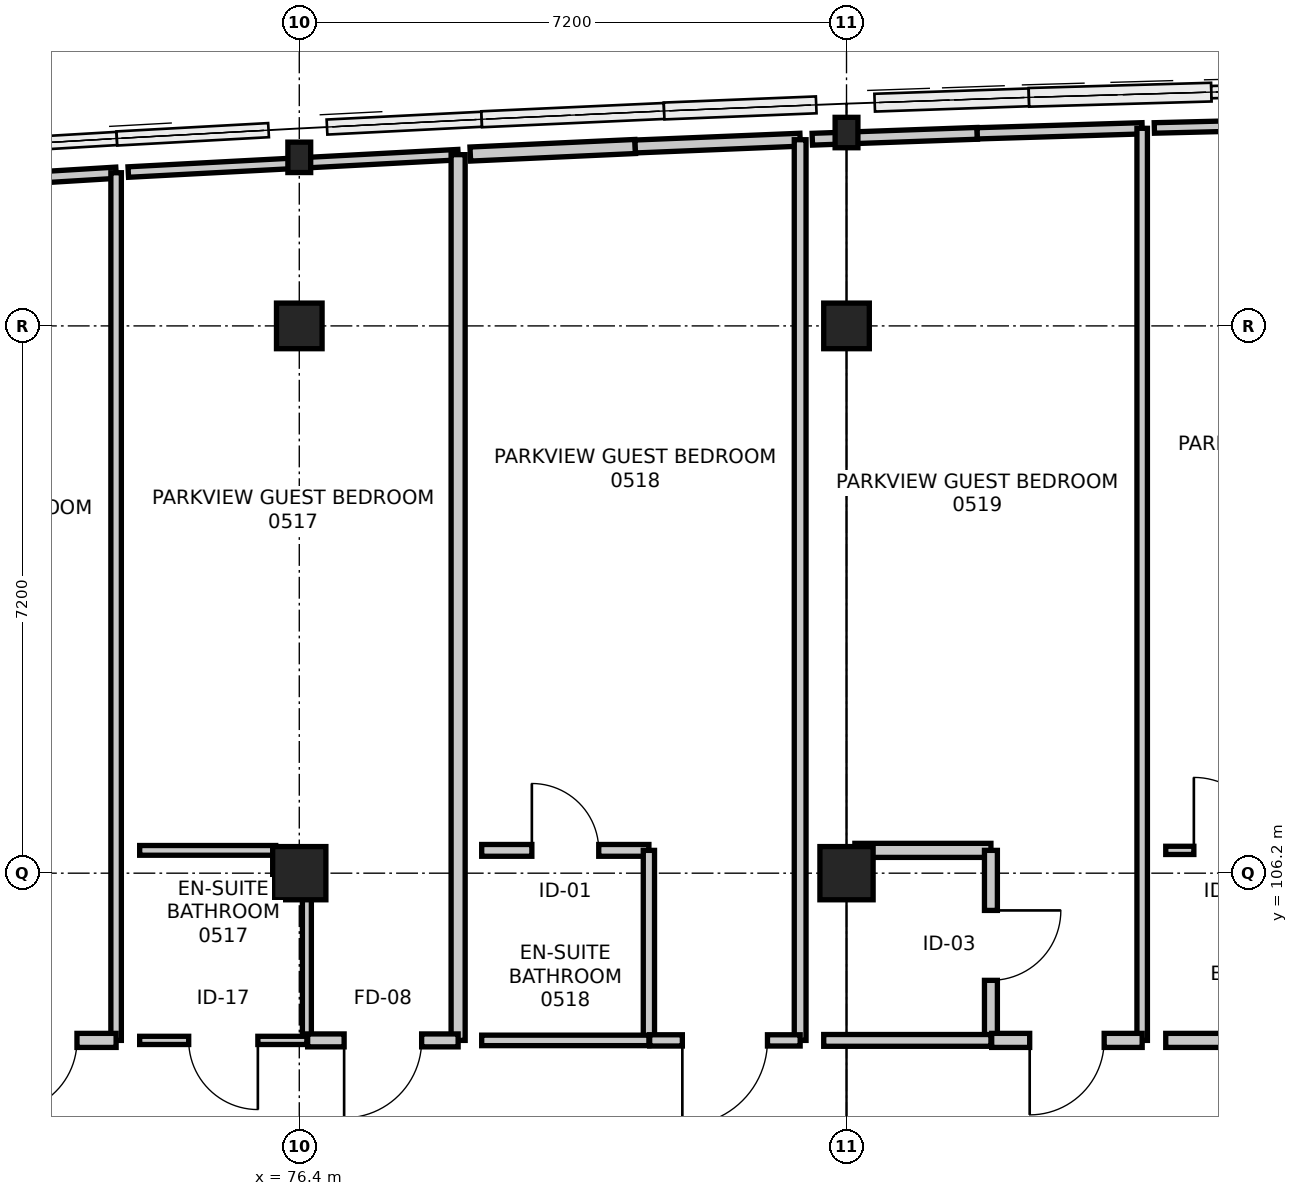
"""IFC4 building model, lengths in metres.
Left out: names, types, materials, properties, quantities, classifications, styles, units other than length and angle.
Written with IfcOpenShell. Run it as: python <this file> out.ifc"""

import sys

from ifc_helpers import new_model, si_unit, direction, frame, frame_2d, origin, origin_2d, place, context, subcontext, project, spatial, rectangle, i_section, extrude, element, fill, save


model = new_model("IFC4")
c1 = context("Model", 3, precision=1e-05, world=origin(), true_north=direction((0.0, 1.0)))
c2 = subcontext(c1, "Body", "Model", "MODEL_VIEW")
j1 = project(units=[si_unit("LENGTHUNIT", "METRE"), si_unit("PLANEANGLEUNIT", "RADIAN")], contexts=[c1])
p1 = place(None, origin())
s1 = spatial("IfcSite", under=j1, at=p1, CompositionType="ELEMENT")
p2 = place(p1, origin())
s2 = spatial("IfcBuilding", under=s1, at=p2, CompositionType="ELEMENT")
p3 = place(p2, frame((0.0, 0.0, 22.8)))
s3 = spatial("IfcBuildingStorey", under=s2, at=p3, CompositionType="ELEMENT", Elevation=22.8)
p4 = place(p3, frame((76.4, 106.2, 0.0), z_axis=(0.0, 0.0, 1.0), x_axis=(1.0, 0.0, 0.0)))
e1 = element("IfcColumn", 1, at=p4, inside=s3, PredefinedType="COLUMN", context=c2, shape_type="SweptSolid", body=[
    extrude(rectangle(XDim=0.7, YDim=0.7, at=origin_2d()), origin(), (0.0, 0.0, 1.0), 3.6),
])
p5 = place(p3, frame((76.4, 113.4, 0.0), z_axis=(0.0, 0.0, 1.0), x_axis=(1.0, 0.0, 0.0)))
e2 = element("IfcColumn", 2, at=p5, inside=s3, PredefinedType="COLUMN", context=c2, shape_type="SweptSolid", body=[
    extrude(rectangle(XDim=0.6, YDim=0.6, at=origin_2d()), origin(), (0.0, 0.0, 1.0), 3.6),
])
p6 = place(p3, frame((76.4, 115.618, 0.0), z_axis=(0.0, 0.0, 1.0), x_axis=(1.0, 0.0, 0.0)))
e3 = element("IfcColumn", 3, at=p6, inside=s3, PredefinedType="COLUMN", context=c2, shape_type="SweptSolid", body=[
    extrude(i_section(OverallWidth=0.3, OverallDepth=0.4, WebThickness=0.013, FlangeThickness=0.024, FilletRadius=0.027, at=origin_2d()), origin(), (0.0, 0.0, 1.0), 3.6),
])
p7 = place(p3, frame((83.6, 106.2, 0.0), z_axis=(0.0, 0.0, 1.0), x_axis=(1.0, 0.0, 0.0)))
e4 = element("IfcColumn", 4, at=p7, inside=s3, PredefinedType="COLUMN", context=c2, shape_type="SweptSolid", body=[
    extrude(rectangle(XDim=0.7, YDim=0.7, at=origin_2d()), origin(), (0.0, 0.0, 1.0), 3.6),
])
p8 = place(p3, frame((83.6, 113.4, 0.0), z_axis=(0.0, 0.0, 1.0), x_axis=(1.0, 0.0, 0.0)))
e5 = element("IfcColumn", 5, at=p8, inside=s3, PredefinedType="COLUMN", context=c2, shape_type="SweptSolid", body=[
    extrude(rectangle(XDim=0.6, YDim=0.6, at=origin_2d()), origin(), (0.0, 0.0, 1.0), 3.6),
])
p9 = place(p3, frame((83.6, 115.944, 0.0), z_axis=(0.0, 0.0, 1.0), x_axis=(1.0, 0.0, 0.0)))
e6 = element("IfcColumn", 6, at=p9, inside=s3, PredefinedType="COLUMN", context=c2, shape_type="SweptSolid", body=[
    extrude(i_section(OverallWidth=0.3, OverallDepth=0.4, WebThickness=0.013, FlangeThickness=0.024, FilletRadius=0.027, at=origin_2d()), origin(), (0.0, 0.0, 1.0), 3.6),
])
p10 = place(p3, frame((69.65, 115.152, 0.0), z_axis=(0.0, 0.0, 1.0), x_axis=(0.998169832058, 0.060473021833, 0.0)))
e7 = element("IfcWall", 7, at=p10, inside=s3, PredefinedType="PARTITIONING", context=c2, shape_type="SweptSolid", body=[
    extrude(rectangle(XDim=4.348, YDim=0.148, at=frame_2d((2.174, 0.0))), origin(), (0.0, 0.0, 1.0), 2.926),
])
p11 = place(p3, frame((73.99, 115.415, 0.0), z_axis=(0.0, 0.0, 1.0), x_axis=(0.0, -1.0, 0.0)))
e8 = element("IfcWall", 8, at=p11, inside=s3, PredefinedType="PARTITIONING", context=c2, shape_type="SweptSolid", body=[
    extrude(rectangle(XDim=11.415, YDim=0.138, at=frame_2d((5.708, 0.0))), origin(), (0.0, 0.0, 1.0), 2.735),
])
p12 = place(p3, frame((73.99, 104.0, 0.0), z_axis=(0.0, 0.0, 1.0), x_axis=(-1.0, 0.0, 0.0)))
e9 = element("IfcWall", 9, at=p12, inside=s3, PredefinedType="PARTITIONING", context=c2, shape_type="SweptSolid", body=[
    extrude(rectangle(XDim=1.98, YDim=0.185, at=frame_2d((0.99, 0.0))), origin(), (0.0, 0.0, 1.0), 3.35),
])
p13 = place(p12, frame((0.515, 0.0, 0.0)))
e10 = element("IfcOpeningElement", 10, at=p13, cuts=e9, PredefinedType="OPENING", context=c2, shape_type="SweptSolid", body=[
    extrude(rectangle(XDim=0.95, YDim=2.1, at=frame_2d((0.475, 1.05))), frame((0.0, 0.103, 0.0), z_axis=(0.0, -1.0, 0.0), x_axis=(1.0, 0.0, 0.0)), (0.0, 0.0, 1.0), 0.205),
])
p14 = place(p3, frame((74.3, 106.5, 0.0), z_axis=(0.0, 0.0, 1.0), x_axis=(1.0, 0.0, 0.0)))
e11 = element("IfcWall", 11, at=p14, inside=s3, PredefinedType="PARTITIONING", context=c2, shape_type="SweptSolid", body=[
    extrude(rectangle(XDim=1.79, YDim=0.128, at=frame_2d((0.895, 0.0))), origin(), (0.0, 0.0, 1.0), 3.35),
])
p15 = place(p3, frame((76.5, 106.09, 0.0), z_axis=(0.0, 0.0, 1.0), x_axis=(0.0, -1.0, 0.0)))
e12 = element("IfcWall", 12, at=p15, inside=s3, PredefinedType="PARTITIONING", context=c2, shape_type="SweptSolid", body=[
    extrude(rectangle(XDim=2.09, YDim=0.118, at=frame_2d((1.045, 0.0))), origin(), (0.0, 0.0, 1.0), 2.685),
])
p16 = place(p3, frame((76.5, 104.0, 0.0), z_axis=(0.0, 0.0, 1.0), x_axis=(-1.0, 0.0, 0.0)))
e13 = element("IfcWall", 13, at=p16, inside=s3, PredefinedType="PARTITIONING", context=c2, shape_type="SweptSolid", body=[
    extrude(rectangle(XDim=2.2, YDim=0.108, at=frame_2d((1.1, 0.0))), origin(), (0.0, 0.0, 1.0), 2.685),
])
p17 = place(p16, frame((0.645, 0.0, 0.0)))
e14 = element("IfcOpeningElement", 14, at=p17, cuts=e13, PredefinedType="OPENING", context=c2, shape_type="SweptSolid", body=[
    extrude(rectangle(XDim=0.91, YDim=2.11, at=frame_2d((0.455, 1.055))), frame((0.0, 0.064, 0.0), z_axis=(0.0, -1.0, 0.0), x_axis=(1.0, 0.0, 0.0)), (0.0, 0.0, 1.0), 0.128),
])
p18 = place(p3, frame((74.15, 115.424, 0.0), z_axis=(0.0, 0.0, 1.0), x_axis=(0.998613791759, 0.052635490965, 0.0)))
e15 = element("IfcWall", 15, at=p18, inside=s3, PredefinedType="PARTITIONING", context=c2, shape_type="SweptSolid", body=[
    extrude(rectangle(XDim=4.346, YDim=0.138, at=frame_2d((2.173, 0.0))), origin(), (0.0, 0.0, 1.0), 2.926),
])
p19 = place(p3, frame((78.49, 115.653, 0.0), z_axis=(0.0, 0.0, 1.0), x_axis=(0.0, -1.0, 0.0)))
e16 = element("IfcWall", 16, at=p19, inside=s3, PredefinedType="PARTITIONING", context=c2, shape_type="SweptSolid", body=[
    extrude(rectangle(XDim=11.653, YDim=0.185, at=frame_2d((5.826, 0.0))), origin(), (0.0, 0.0, 1.0), 2.735),
])
p20 = place(p3, frame((78.49, 104.0, 0.0), z_axis=(0.0, 0.0, 1.0), x_axis=(-1.0, 0.0, 0.0)))
e17 = element("IfcWall", 17, at=p20, inside=s3, PredefinedType="PARTITIONING", context=c2, shape_type="SweptSolid", body=[
    extrude(rectangle(XDim=1.98, YDim=0.17, at=frame_2d((0.99, 0.0))), origin(), (0.0, 0.0, 1.0), 2.685),
])
p21 = place(p20, frame((0.48, 0.0, 0.0)))
e18 = element("IfcOpeningElement", 18, at=p21, cuts=e17, PredefinedType="OPENING", context=c2, shape_type="SweptSolid", body=[
    extrude(rectangle(XDim=1.02, YDim=2.15, at=frame_2d((0.51, 1.075))), frame((0.0, 0.095, 0.0), z_axis=(0.0, -1.0, 0.0), x_axis=(1.0, 0.0, 0.0)), (0.0, 0.0, 1.0), 0.19),
])
p22 = place(p3, frame((78.8, 106.5, 0.0), z_axis=(0.0, 0.0, 1.0), x_axis=(1.0, 0.0, 0.0)))
e19 = element("IfcWall", 19, at=p22, inside=s3, PredefinedType="PARTITIONING", context=c2, shape_type="SweptSolid", body=[
    extrude(rectangle(XDim=2.2, YDim=0.155, at=frame_2d((1.1, 0.0))), origin(), (0.0, 0.0, 1.0), 3.35),
])
p23 = place(p22, frame((0.66, 0.0, 0.0)))
e20 = element("IfcOpeningElement", 20, at=p23, cuts=e19, PredefinedType="OPENING", context=c2, shape_type="SweptSolid", body=[
    extrude(rectangle(XDim=0.88, YDim=2.06, at=frame_2d((0.44, 1.03))), frame((0.0, 0.087, 0.0), z_axis=(0.0, -1.0, 0.0), x_axis=(1.0, 0.0, 0.0)), (0.0, 0.0, 1.0), 0.175),
])
p24 = place(p3, frame((81.0, 106.5, 0.0), z_axis=(0.0, 0.0, 1.0), x_axis=(0.0, -1.0, 0.0)))
e21 = element("IfcWall", 21, at=p24, inside=s3, PredefinedType="PARTITIONING", context=c2, shape_type="SweptSolid", body=[
    extrude(rectangle(XDim=2.5, YDim=0.148, at=frame_2d((1.25, 0.0))), origin(), (0.0, 0.0, 1.0), 2.735),
])
p25 = place(p3, frame((81.0, 104.0, 0.0), z_axis=(0.0, 0.0, 1.0), x_axis=(-1.0, 0.0, 0.0)))
e22 = element("IfcWall", 22, at=p25, inside=s3, PredefinedType="PARTITIONING", context=c2, shape_type="SweptSolid", body=[
    extrude(rectangle(XDim=2.2, YDim=0.138, at=frame_2d((1.1, 0.0))), origin(), (0.0, 0.0, 1.0), 3.35),
])
p26 = place(p3, frame((78.65, 115.661, 0.0), z_axis=(0.0, 0.0, 1.0), x_axis=(0.998953423906, 0.045739008159, 0.0)))
e23 = element("IfcWall", 23, at=p26, inside=s3, PredefinedType="PARTITIONING", context=c2, shape_type="SweptSolid", body=[
    extrude(rectangle(XDim=2.172, YDim=0.185, at=frame_2d((1.086, 0.0))), origin(), (0.0, 0.0, 1.0), 2.926),
])
p27 = place(p3, frame((80.82, 115.76, 0.0), z_axis=(0.0, 0.0, 1.0), x_axis=(0.999153216902, 0.041144248131, 0.0)))
e24 = element("IfcWall", 24, at=p27, inside=s3, PredefinedType="PARTITIONING", context=c2, shape_type="SweptSolid", body=[
    extrude(rectangle(XDim=2.172, YDim=0.17, at=frame_2d((1.086, 0.0))), origin(), (0.0, 0.0, 1.0), 2.926),
])
p28 = place(p3, frame((82.99, 115.85, 0.0), z_axis=(0.0, 0.0, 1.0), x_axis=(0.0, -1.0, 0.0)))
e25 = element("IfcWall", 25, at=p28, inside=s3, PredefinedType="PARTITIONING", context=c2, shape_type="SweptSolid", body=[
    extrude(rectangle(XDim=11.85, YDim=0.155, at=frame_2d((5.925, 0.0))), origin(), (0.0, 0.0, 1.0), 2.735),
])
p29 = place(p3, frame((82.99, 104.0, 0.0), z_axis=(0.0, 0.0, 1.0), x_axis=(-1.0, 0.0, 0.0)))
e26 = element("IfcWall", 26, at=p29, inside=s3, PredefinedType="PARTITIONING", context=c2, shape_type="SweptSolid", body=[
    extrude(rectangle(XDim=1.98, YDim=0.148, at=frame_2d((0.99, 0.0))), origin(), (0.0, 0.0, 1.0), 3.35),
])
p30 = place(p29, frame((0.43, 0.0, 0.0)))
e27 = element("IfcOpeningElement", 27, at=p30, cuts=e26, PredefinedType="OPENING", context=c2, shape_type="SweptSolid", body=[
    extrude(rectangle(XDim=1.12, YDim=2.2, at=frame_2d((0.56, 1.1))), frame((0.0, 0.084, 0.0), z_axis=(0.0, -1.0, 0.0), x_axis=(1.0, 0.0, 0.0)), (0.0, 0.0, 1.0), 0.168),
])
p31 = place(p3, frame((83.71, 106.5, 0.0), z_axis=(0.0, 0.0, 1.0), x_axis=(1.0, 0.0, 0.0)))
e28 = element("IfcWall", 28, at=p31, inside=s3, PredefinedType="PARTITIONING", context=c2, shape_type="SweptSolid", body=[
    extrude(rectangle(XDim=1.79, YDim=0.185, at=frame_2d((0.895, 0.0))), origin(), (0.0, 0.0, 1.0), 2.685),
])
p32 = place(p3, frame((85.5, 106.5, 0.0), z_axis=(0.0, 0.0, 1.0), x_axis=(0.0, -1.0, 0.0)))
e29 = element("IfcWall", 29, at=p32, inside=s3, PredefinedType="PARTITIONING", context=c2, shape_type="SweptSolid", body=[
    extrude(rectangle(XDim=2.5, YDim=0.17, at=frame_2d((1.25, 0.0))), origin(), (0.0, 0.0, 1.0), 2.735),
])
p33 = place(p32, frame((0.79, 0.0, 0.0)))
e30 = element("IfcOpeningElement", 30, at=p33, cuts=e29, PredefinedType="OPENING", context=c2, shape_type="SweptSolid", body=[
    extrude(rectangle(XDim=0.92, YDim=2.1, at=frame_2d((0.46, 1.05))), frame((0.0, 0.095, 0.0), z_axis=(0.0, -1.0, 0.0), x_axis=(1.0, 0.0, 0.0)), (0.0, 0.0, 1.0), 0.19),
])
p34 = place(p3, frame((85.5, 104.0, 0.0), z_axis=(0.0, 0.0, 1.0), x_axis=(-1.0, 0.0, 0.0)))
e31 = element("IfcWall", 31, at=p34, inside=s3, PredefinedType="PARTITIONING", context=c2, shape_type="SweptSolid", body=[
    extrude(rectangle(XDim=2.2, YDim=0.155, at=frame_2d((1.1, 0.0))), origin(), (0.0, 0.0, 1.0), 2.685),
])
p35 = place(p3, frame((83.15, 115.856, 0.0), z_axis=(0.0, 0.0, 1.0), x_axis=(0.999364714838, 0.03563939865, 0.0)))
e32 = element("IfcWall", 32, at=p35, inside=s3, PredefinedType="PARTITIONING", context=c2, shape_type="SweptSolid", body=[
    extrude(rectangle(XDim=2.172, YDim=0.155, at=frame_2d((1.086, 0.0))), origin(), (0.0, 0.0, 1.0), 2.926),
])
p36 = place(p3, frame((85.32, 115.933, 0.0), z_axis=(0.0, 0.0, 1.0), x_axis=(0.999535487068, 0.030476385801, 0.0)))
e33 = element("IfcWall", 33, at=p36, inside=s3, PredefinedType="PARTITIONING", context=c2, shape_type="SweptSolid", body=[
    extrude(rectangle(XDim=2.171, YDim=0.148, at=frame_2d((1.085, 0.0))), origin(), (0.0, 0.0, 1.0), 2.926),
])
p37 = place(p3, frame((87.49, 116.0, 0.0), z_axis=(0.0, 0.0, 1.0), x_axis=(0.0, -1.0, 0.0)))
e34 = element("IfcWall", 34, at=p37, inside=s3, PredefinedType="PARTITIONING", context=c2, shape_type="SweptSolid", body=[
    extrude(rectangle(XDim=12.0, YDim=0.138, at=frame_2d((6.0, 0.0))), origin(), (0.0, 0.0, 1.0), 2.735),
])
p38 = place(p3, frame((87.49, 104.0, 0.0), z_axis=(0.0, 0.0, 1.0), x_axis=(-1.0, 0.0, 0.0)))
e35 = element("IfcWall", 35, at=p38, inside=s3, PredefinedType="PARTITIONING", context=c2, shape_type="SweptSolid", body=[
    extrude(rectangle(XDim=1.98, YDim=0.185, at=frame_2d((0.99, 0.0))), origin(), (0.0, 0.0, 1.0), 3.35),
])
p39 = place(p38, frame((0.5, 0.0, 0.0)))
e36 = element("IfcOpeningElement", 36, at=p39, cuts=e35, PredefinedType="OPENING", context=c2, shape_type="SweptSolid", body=[
    extrude(rectangle(XDim=0.98, YDim=2.15, at=frame_2d((0.49, 1.075))), frame((0.0, 0.103, 0.0), z_axis=(0.0, -1.0, 0.0), x_axis=(1.0, 0.0, 0.0)), (0.0, 0.0, 1.0), 0.205),
])
p40 = place(p3, frame((87.8, 106.5, 0.0), z_axis=(0.0, 0.0, 1.0), x_axis=(1.0, 0.0, 0.0)))
e37 = element("IfcWall", 37, at=p40, inside=s3, PredefinedType="PARTITIONING", context=c2, shape_type="SweptSolid", body=[
    extrude(rectangle(XDim=2.2, YDim=0.108, at=frame_2d((1.1, 0.0))), origin(), (0.0, 0.0, 1.0), 3.35),
])
p41 = place(p40, frame((0.37, 0.0, 0.0)))
e38 = element("IfcOpeningElement", 38, at=p41, cuts=e37, PredefinedType="OPENING", context=c2, shape_type="SweptSolid", body=[
    extrude(rectangle(XDim=0.96, YDim=2.14, at=frame_2d((0.48, 1.07))), frame((0.0, 0.064, 0.0), z_axis=(0.0, -1.0, 0.0), x_axis=(1.0, 0.0, 0.0)), (0.0, 0.0, 1.0), 0.128),
])
p42 = place(p3, frame((90.0, 104.0, 0.0), z_axis=(0.0, 0.0, 1.0), x_axis=(-1.0, 0.0, 0.0)))
e39 = element("IfcWall", 39, at=p42, inside=s3, PredefinedType="PARTITIONING", context=c2, shape_type="SweptSolid", body=[
    extrude(rectangle(XDim=2.2, YDim=0.185, at=frame_2d((1.1, 0.0))), origin(), (0.0, 0.0, 1.0), 3.35),
])
p43 = place(p3, frame((87.65, 116.004, 0.0), z_axis=(0.0, 0.0, 1.0), x_axis=(0.999696642479, 0.024629718158, 0.0)))
e40 = element("IfcWall", 40, at=p43, inside=s3, PredefinedType="PARTITIONING", context=c2, shape_type="SweptSolid", body=[
    extrude(rectangle(XDim=2.171, YDim=0.138, at=frame_2d((1.085, 0.0))), origin(), (0.0, 0.0, 1.0), 2.926),
])
p44 = place(p13, origin())
e41 = element("IfcDoor", 41, at=p44, inside=s3, OperationType="SINGLE_SWING_RIGHT", PredefinedType="DOOR", context=c2, shape_type="SweptSolid", body=[
    extrude(rectangle(XDim=0.95, YDim=2.1, at=frame_2d((0.475, 1.05))), frame((0.0, 0.025, 0.0), z_axis=(0.0, -1.0, 0.0), x_axis=(1.0, 0.0, 0.0)), (0.0, 0.0, 1.0), 0.05),
])
fill(e10, e41)
p45 = place(p17, origin())
e42 = element("IfcDoor", 42, at=p45, inside=s3, OperationType="SINGLE_SWING_LEFT", PredefinedType="DOOR", context=c2, shape_type="SweptSolid", body=[
    extrude(rectangle(XDim=0.91, YDim=2.11, at=frame_2d((0.455, 1.055))), frame((0.0, 0.025, 0.0), z_axis=(0.0, -1.0, 0.0), x_axis=(1.0, 0.0, 0.0)), (0.0, 0.0, 1.0), 0.05),
])
fill(e14, e42)
p46 = place(p21, origin())
e43 = element("IfcDoor", 43, at=p46, inside=s3, OperationType="SINGLE_SWING_RIGHT", PredefinedType="DOOR", context=c2, shape_type="SweptSolid", body=[
    extrude(rectangle(XDim=1.02, YDim=2.15, at=frame_2d((0.51, 1.075))), frame((0.0, 0.025, 0.0), z_axis=(0.0, -1.0, 0.0), x_axis=(1.0, 0.0, 0.0)), (0.0, 0.0, 1.0), 0.05),
])
fill(e18, e43)
p47 = place(p23, origin())
e44 = element("IfcDoor", 44, at=p47, inside=s3, OperationType="SINGLE_SWING_LEFT", PredefinedType="DOOR", context=c2, shape_type="SweptSolid", body=[
    extrude(rectangle(XDim=0.88, YDim=2.06, at=frame_2d((0.44, 1.03))), frame((0.0, 0.025, 0.0), z_axis=(0.0, -1.0, 0.0), x_axis=(1.0, 0.0, 0.0)), (0.0, 0.0, 1.0), 0.05),
])
fill(e20, e44)
p48 = place(p30, origin())
e45 = element("IfcDoor", 45, at=p48, inside=s3, OperationType="SINGLE_SWING_RIGHT", PredefinedType="DOOR", context=c2, shape_type="SweptSolid", body=[
    extrude(rectangle(XDim=1.12, YDim=2.2, at=frame_2d((0.56, 1.1))), frame((0.0, 0.025, 0.0), z_axis=(0.0, -1.0, 0.0), x_axis=(1.0, 0.0, 0.0)), (0.0, 0.0, 1.0), 0.05),
])
fill(e27, e45)
p49 = place(p33, origin())
e46 = element("IfcDoor", 46, at=p49, inside=s3, OperationType="SINGLE_SWING_LEFT", PredefinedType="DOOR", context=c2, shape_type="SweptSolid", body=[
    extrude(rectangle(XDim=0.92, YDim=2.1, at=frame_2d((0.46, 1.05))), frame((0.0, 0.025, 0.0), z_axis=(0.0, -1.0, 0.0), x_axis=(1.0, 0.0, 0.0)), (0.0, 0.0, 1.0), 0.05),
])
fill(e30, e46)
p50 = place(p39, origin())
e47 = element("IfcDoor", 47, at=p50, inside=s3, OperationType="SINGLE_SWING_RIGHT", PredefinedType="DOOR", context=c2, shape_type="SweptSolid", body=[
    extrude(rectangle(XDim=0.98, YDim=2.15, at=frame_2d((0.49, 1.075))), frame((0.0, 0.025, 0.0), z_axis=(0.0, -1.0, 0.0), x_axis=(1.0, 0.0, 0.0)), (0.0, 0.0, 1.0), 0.05),
])
fill(e36, e47)
p51 = place(p41, origin())
e48 = element("IfcDoor", 48, at=p51, inside=s3, OperationType="SINGLE_SWING_LEFT", PredefinedType="DOOR", context=c2, shape_type="SweptSolid", body=[
    extrude(rectangle(XDim=0.96, YDim=2.14, at=frame_2d((0.48, 1.07))), frame((0.0, 0.025, 0.0), z_axis=(0.0, -1.0, 0.0), x_axis=(1.0, 0.0, 0.0)), (0.0, 0.0, 1.0), 0.05),
])
fill(e38, e48)
save(model, sys.argv[1])
